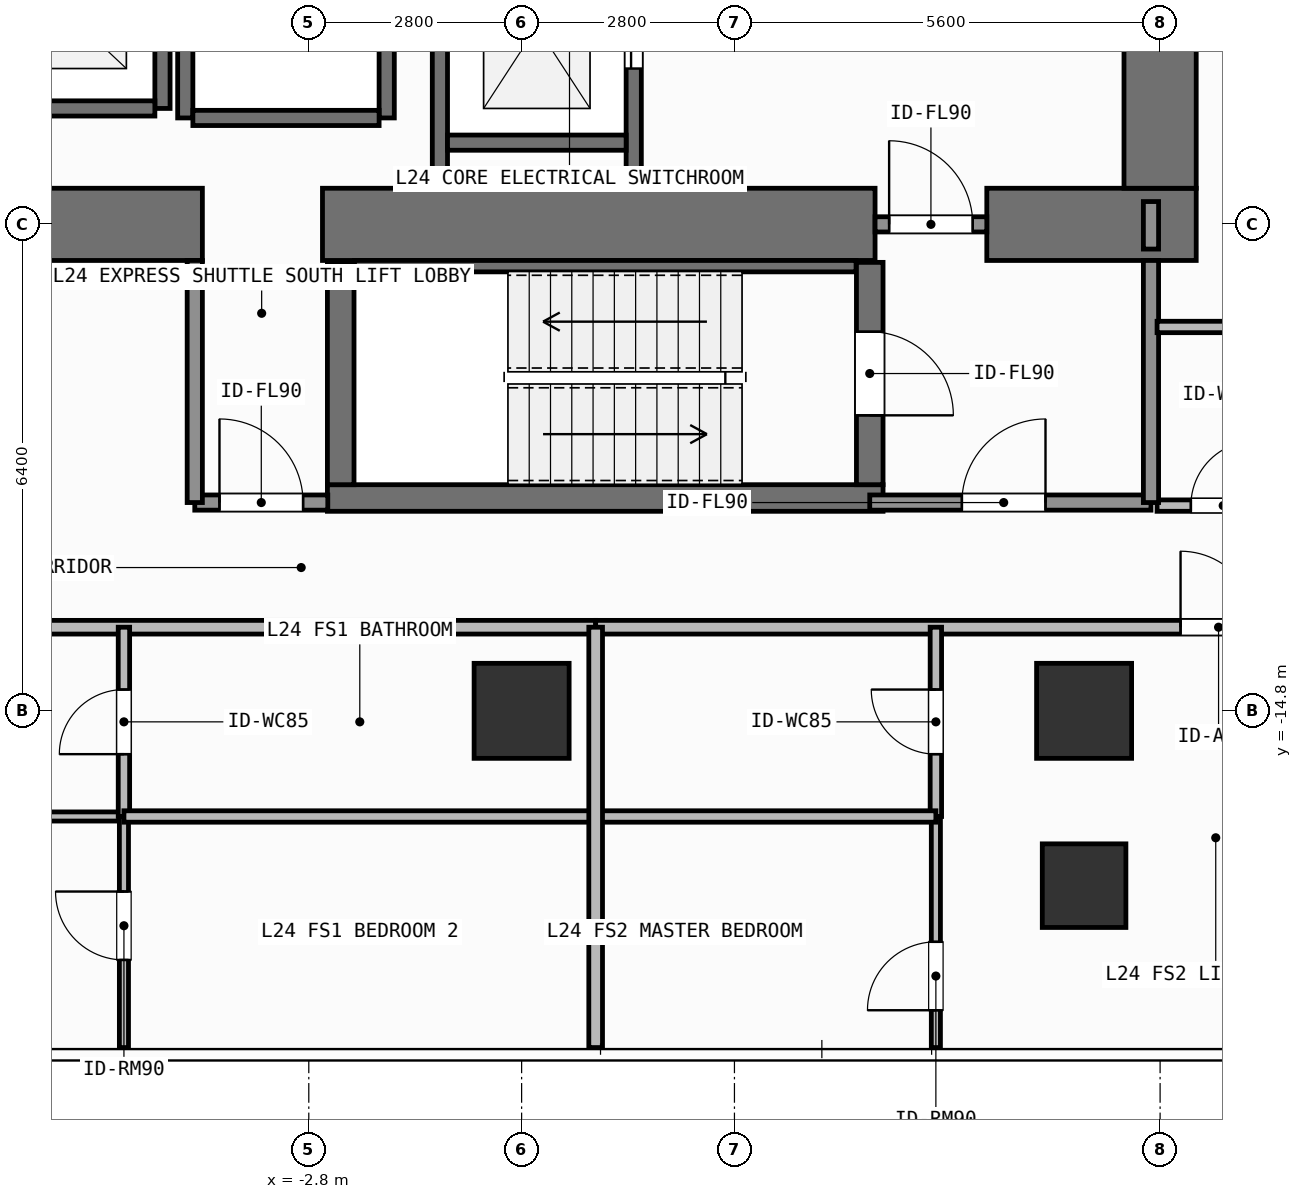
"""IFC4 building model, lengths in metres.
Left out: names, types, materials, properties, quantities, classifications, styles, units other than length and angle.
Written with IfcOpenShell. Run it as: python <this file> out.ifc"""

import sys

from ifc_helpers import new_model, si_unit, direction, frame, frame_2d, origin, origin_2d, place, context, subcontext, project, spatial, rectangle, extrude, element, fill, save


model = new_model("IFC4")
c1 = context("Model", 3, precision=1e-05, world=origin(), true_north=direction((0.0, 1.0)))
c2 = subcontext(c1, "Body", "Model", "MODEL_VIEW")
j1 = project(units=[si_unit("LENGTHUNIT", "METRE"), si_unit("PLANEANGLEUNIT", "RADIAN")], contexts=[c1])
p1 = place(None, origin())
s1 = spatial("IfcSite", under=j1, at=p1, CompositionType="ELEMENT")
p2 = place(p1, origin())
s2 = spatial("IfcBuilding", under=s1, at=p2, CompositionType="ELEMENT")
p3 = place(p2, frame((0.0, 0.0, 96.9)))
s3 = spatial("IfcBuildingStorey", under=s2, at=p3, CompositionType="ELEMENT", Elevation=96.9)
p4 = place(p3, frame((-7.55, -8.4, 0.0), z_axis=(0.0, 0.0, 1.0), x_axis=(1.0, 0.0, 0.0)))
e1 = element("IfcWall", 1, at=p4, inside=s3, PredefinedType="SHEAR", context=c2, shape_type="SweptSolid", body=[
    extrude(rectangle(XDim=3.35, YDim=0.95, at=frame_2d((1.675, 0.0))), origin(), (0.0, 0.0, 1.0), 3.9),
])
p5 = place(p3, frame((-2.62, -8.4, 0.0), z_axis=(0.0, 0.0, 1.0), x_axis=(1.0, 0.0, 0.0)))
e2 = element("IfcWall", 2, at=p5, inside=s3, PredefinedType="SHEAR", context=c2, shape_type="SweptSolid", body=[
    extrude(rectangle(XDim=7.27, YDim=0.95, at=frame_2d((3.635, 0.0))), origin(), (0.0, 0.0, 1.0), 3.9),
])
p6 = place(p3, frame((6.12, -8.4, 0.0), z_axis=(0.0, 0.0, 1.0), x_axis=(1.0, 0.0, 0.0)))
e3 = element("IfcWall", 3, at=p6, inside=s3, PredefinedType="SHEAR", context=c2, shape_type="SweptSolid", body=[
    extrude(rectangle(XDim=2.755, YDim=0.95, at=frame_2d((1.377, 0.0))), origin(), (0.0, 0.0, 1.0), 3.9),
])
p7 = place(p3, frame((8.4, -7.925, 0.0), z_axis=(0.0, 0.0, 1.0), x_axis=(0.0, 1.0, 0.0)))
e4 = element("IfcWall", 4, at=p7, inside=s3, PredefinedType="SHEAR", context=c2, shape_type="SweptSolid", body=[
    extrude(rectangle(XDim=2.1, YDim=0.95, at=frame_2d((1.05, 0.0))), origin(), (0.0, 0.0, 1.0), 3.9),
])
p8 = place(p3, frame((-2.555, -12.0, 0.0), z_axis=(0.0, 0.0, 1.0), x_axis=(1.0, 0.0, 0.0)))
e5 = element("IfcWall", 5, at=p8, inside=s3, PredefinedType="SHEAR", context=c2, shape_type="SweptSolid", body=[
    extrude(rectangle(XDim=7.31, YDim=0.35, at=frame_2d((3.655, 0.0))), origin(), (0.0, 0.0, 1.0), 3.9),
])
p9 = place(p3, frame((-2.2, -8.95, 0.0), z_axis=(0.0, 0.0, 1.0), x_axis=(1.0, 0.0, 0.0)))
e6 = element("IfcWall", 6, at=p9, inside=s3, PredefinedType="SHEAR", context=c2, shape_type="SweptSolid", body=[
    extrude(rectangle(XDim=6.6, YDim=0.15, at=frame_2d((3.3, 0.0))), origin(), (0.0, 0.0, 1.0), 3.9),
])
p10 = place(p3, frame((-2.38, -11.825, 0.0), z_axis=(0.0, 0.0, 1.0), x_axis=(0.0, 1.0, 0.0)))
e7 = element("IfcWall", 7, at=p10, inside=s3, PredefinedType="SHEAR", context=c2, shape_type="SweptSolid", body=[
    extrude(rectangle(XDim=2.925, YDim=0.35, at=frame_2d((1.462, 0.0))), origin(), (0.0, 0.0, 1.0), 3.9),
])
p11 = place(p3, frame((4.58, -8.9, 0.0), z_axis=(0.0, 0.0, 1.0), x_axis=(0.0, -1.0, 0.0)))
e8 = element("IfcWall", 8, at=p11, inside=s3, PredefinedType="SHEAR", context=c2, shape_type="SweptSolid", body=[
    extrude(rectangle(XDim=2.925, YDim=0.35, at=frame_2d((1.462, 0.0))), origin(), (0.0, 0.0, 1.0), 3.9),
])
p12 = place(p11, frame((0.913, 0.0, 0.0)))
e9 = element("IfcOpeningElement", 9, at=p12, cuts=e8, PredefinedType="OPENING", context=c2, shape_type="SweptSolid", body=[
    extrude(rectangle(XDim=1.1, YDim=2.15, at=frame_2d((0.55, 1.075))), frame((0.0, 0.185, 0.0), z_axis=(0.0, -1.0, 0.0), x_axis=(1.0, 0.0, 0.0)), (0.0, 0.0, 1.0), 0.37),
])
for number, where, z_axis, x_axis in (
    (10, (0.0, -14.8, 0.0), (0.0, 0.0, 1.0), (1.0, 0.0, 0.0)),
    (11, (7.4, -14.8, 0.0), (0.0, 0.0, 1.0), (1.0, 0.0, 0.0)),
):
    element("IfcColumn", number, at=place(p3, frame(where, z_axis=z_axis, x_axis=x_axis)), inside=s3, PredefinedType="COLUMN", context=c2, shape_type="SweptSolid", body=[
        extrude(rectangle(XDim=1.25, YDim=1.25, at=origin_2d()), origin(), (0.0, 0.0, 1.0), 3.9),
    ])
p13 = place(p3, frame((7.4, -17.1, 0.0), z_axis=(0.0, 0.0, 1.0), x_axis=(1.0, 0.0, 0.0)))
e12 = element("IfcColumn", 12, at=p13, inside=s3, PredefinedType="COLUMN", context=c2, shape_type="SweptSolid", body=[
    extrude(rectangle(XDim=1.1, YDim=1.1, at=origin_2d()), origin(), (0.0, 0.0, 1.0), 3.9),
])
p14 = place(p3, frame((-4.725, -6.875, 0.0), z_axis=(0.0, 0.0, 1.0), x_axis=(0.0, 1.0, 0.0)))
e13 = element("IfcWall", 13, at=p14, inside=s3, PredefinedType="SHEAR", context=c2, shape_type="SweptSolid", body=[
    extrude(rectangle(XDim=2.55, YDim=0.2, at=frame_2d((1.275, 0.0))), origin(), (0.0, 0.0, 1.0), 3.68),
])
p15 = place(p3, frame((-7.175, -6.875, 0.0), z_axis=(0.0, 0.0, 1.0), x_axis=(1.0, 0.0, 0.0)))
e14 = element("IfcWall", 14, at=p15, inside=s3, PredefinedType="SHEAR", context=c2, shape_type="SweptSolid", body=[
    extrude(rectangle(XDim=2.35, YDim=0.2, at=frame_2d((1.175, 0.0))), origin(), (0.0, 0.0, 1.0), 3.68),
])
for number, where, z_axis, x_axis in (
    (15, (-4.425, -7.0, 0.0), (0.0, 0.0, 1.0), (0.0, 1.0, 0.0)),
    (16, (-1.775, -7.0, 0.0), (0.0, 0.0, 1.0), (0.0, 1.0, 0.0)),
):
    element("IfcWall", number, at=place(p3, frame(where, z_axis=z_axis, x_axis=x_axis)), inside=s3, PredefinedType="SHEAR", context=c2, shape_type="SweptSolid", body=[
        extrude(rectangle(XDim=2.8, YDim=0.2, at=frame_2d((1.4, 0.0))), origin(), (0.0, 0.0, 1.0), 3.68),
    ])
p16 = place(p3, frame((-4.325, -7.0, 0.0), z_axis=(0.0, 0.0, 1.0), x_axis=(1.0, 0.0, 0.0)))
e17 = element("IfcWall", 17, at=p16, inside=s3, PredefinedType="SHEAR", context=c2, shape_type="SweptSolid", body=[
    extrude(rectangle(XDim=2.45, YDim=0.2, at=frame_2d((1.225, 0.0))), origin(), (0.0, 0.0, 1.0), 3.68),
])
p17 = place(p3, frame((-1.075, -7.925, 0.0), z_axis=(0.0, 0.0, 1.0), x_axis=(0.0, 1.0, 0.0)))
e18 = element("IfcWall", 18, at=p17, inside=s3, PredefinedType="SHEAR", context=c2, shape_type="SweptSolid", body=[
    extrude(rectangle(XDim=3.65, YDim=0.2, at=frame_2d((1.825, 0.0))), origin(), (0.0, 0.0, 1.0), 3.68),
])
p18 = place(p3, frame((1.475, -7.925, 0.0), z_axis=(0.0, 0.0, 1.0), x_axis=(0.0, 1.0, 0.0)))
e19 = element("IfcWall", 19, at=p18, inside=s3, PredefinedType="SHEAR", context=c2, shape_type="SweptSolid", body=[
    extrude(rectangle(XDim=3.65, YDim=0.2, at=frame_2d((1.825, 0.0))), origin(), (0.0, 0.0, 1.0), 3.68),
])
p19 = place(p18, frame((1.575, 0.0, 0.0)))
e20 = element("IfcOpeningElement", 20, at=p19, cuts=e19, PredefinedType="OPENING", context=c2, shape_type="SweptSolid", body=[
    extrude(rectangle(XDim=1.1, YDim=2.2, at=frame_2d((0.55, 1.1))), frame((0.0, 0.11, 0.0), z_axis=(0.0, -1.0, 0.0), x_axis=(1.0, 0.0, 0.0)), (0.0, 0.0, 1.0), 0.22),
])
p20 = place(p3, frame((-0.975, -7.325, 0.0), z_axis=(0.0, 0.0, 1.0), x_axis=(1.0, 0.0, 0.0)))
e21 = element("IfcWall", 21, at=p20, inside=s3, PredefinedType="SHEAR", context=c2, shape_type="SweptSolid", body=[
    extrude(rectangle(XDim=2.35, YDim=0.2, at=frame_2d((1.175, 0.0))), origin(), (0.0, 0.0, 1.0), 3.68),
])
p21 = place(p3, frame((4.58, -12.06, 0.0), z_axis=(0.0, 0.0, 1.0), x_axis=(1.0, 0.0, 0.0)))
e22 = element("IfcWall", 22, at=p21, inside=s3, PredefinedType="SOLIDWALL", context=c2, shape_type="SweptSolid", body=[
    extrude(rectangle(XDim=3.7, YDim=0.2, at=frame_2d((1.85, 0.0))), origin(), (0.0, 0.0, 1.0), 3.68),
])
p22 = place(p21, frame((1.212, 0.0, 0.0)))
e23 = element("IfcOpeningElement", 23, at=p22, cuts=e22, PredefinedType="OPENING", context=c2, shape_type="SweptSolid", body=[
    extrude(rectangle(XDim=1.1, YDim=2.15, at=frame_2d((0.55, 1.075))), frame((0.0, 0.11, 0.0), z_axis=(0.0, -1.0, 0.0), x_axis=(1.0, 0.0, 0.0)), (0.0, 0.0, 1.0), 0.22),
])
p23 = place(p3, frame((4.65, -8.4, 0.0), z_axis=(0.0, 0.0, 1.0), x_axis=(1.0, 0.0, 0.0)))
e24 = element("IfcWall", 24, at=p23, inside=s3, PredefinedType="SOLIDWALL", context=c2, shape_type="SweptSolid", body=[
    extrude(rectangle(XDim=1.47, YDim=0.2, at=frame_2d((0.735, 0.0))), origin(), (0.0, 0.0, 1.0), 2.72),
])
p24 = place(p23, frame((0.185, 0.0, 0.0)))
e25 = element("IfcOpeningElement", 25, at=p24, cuts=e24, PredefinedType="OPENING", context=c2, shape_type="SweptSolid", body=[
    extrude(rectangle(XDim=1.1, YDim=2.15, at=frame_2d((0.55, 1.075))), frame((0.0, 0.11, 0.0), z_axis=(0.0, -1.0, 0.0), x_axis=(1.0, 0.0, 0.0)), (0.0, 0.0, 1.0), 0.22),
])
p25 = place(p3, frame((-4.3, -12.06, 0.0), z_axis=(0.0, 0.0, 1.0), x_axis=(1.0, 0.0, 0.0)))
e26 = element("IfcWall", 26, at=p25, inside=s3, PredefinedType="SOLIDWALL", context=c2, shape_type="SweptSolid", body=[
    extrude(rectangle(XDim=1.75, YDim=0.2, at=frame_2d((0.875, 0.0))), origin(), (0.0, 0.0, 1.0), 3.68),
])
p26 = place(p25, frame((0.325, 0.0, 0.0)))
e27 = element("IfcOpeningElement", 27, at=p26, cuts=e26, PredefinedType="OPENING", context=c2, shape_type="SweptSolid", body=[
    extrude(rectangle(XDim=1.1, YDim=2.15, at=frame_2d((0.55, 1.075))), frame((0.0, 0.11, 0.0), z_axis=(0.0, -1.0, 0.0), x_axis=(1.0, 0.0, 0.0)), (0.0, 0.0, 1.0), 0.22),
])
p27 = place(p3, frame((8.36, -12.1, 0.0), z_axis=(0.0, 0.0, 1.0), x_axis=(1.0, 0.0, 0.0)))
e28 = element("IfcWall", 28, at=p27, inside=s3, PredefinedType="PARTITIONING", context=c2, shape_type="SweptSolid", body=[
    extrude(rectangle(XDim=1.74, YDim=0.15, at=frame_2d((0.87, 0.0))), origin(), (0.0, 0.0, 1.0), 3.68),
])
p28 = place(p27, frame((0.445, 0.0, 0.0)))
e29 = element("IfcOpeningElement", 29, at=p28, cuts=e28, PredefinedType="OPENING", context=c2, shape_type="SweptSolid", body=[
    extrude(rectangle(XDim=0.85, YDim=2.1, at=frame_2d((0.425, 1.05))), frame((0.0, 0.085, 0.0), z_axis=(0.0, -1.0, 0.0), x_axis=(1.0, 0.0, 0.0)), (0.0, 0.0, 1.0), 0.17),
])
p29 = place(p3, frame((-24.42, -13.7, 0.0), z_axis=(0.0, 0.0, 1.0), x_axis=(1.0, 0.0, 0.0)))
e30 = element("IfcWall", 30, at=p29, inside=s3, PredefinedType="PARTITIONING", context=c2, shape_type="SweptSolid", body=[
    extrude(rectangle(XDim=25.394, YDim=0.18, at=frame_2d((12.697, 0.0))), origin(), (0.0, 0.0, 1.0), 3.68),
])
p30 = place(p29, frame((10.939, 0.0, 0.0)))
e31 = element("IfcOpeningElement", 31, at=p30, cuts=e30, PredefinedType="OPENING", context=c2, shape_type="SweptSolid", body=[
    extrude(rectangle(XDim=1.0, YDim=2.2, at=frame_2d((0.5, 1.1))), frame((0.0, 0.1, 0.0), z_axis=(0.0, -1.0, 0.0), x_axis=(1.0, 0.0, 0.0)), (0.0, 0.0, 1.0), 0.2),
])
p31 = place(p3, frame((-20.725, -16.19, 0.0), z_axis=(0.0, 0.0, 1.0), x_axis=(1.0, 0.0, 0.0)))
e32 = element("IfcWall", 32, at=p31, inside=s3, PredefinedType="PARTITIONING", context=c2, shape_type="SweptSolid", body=[
    extrude(rectangle(XDim=15.493, YDim=0.12, at=frame_2d((7.747, 0.0))), origin(), (0.0, 0.0, 1.0), 3.68),
])
p32 = place(p31, frame((7.296, 0.0, 0.0)))
e33 = element("IfcOpeningElement", 33, at=p32, cuts=e32, PredefinedType="OPENING", context=c2, shape_type="SweptSolid", body=[
    extrude(rectangle(XDim=0.9, YDim=2.1, at=frame_2d((0.45, 1.05))), frame((0.0, 0.07, 0.0), z_axis=(0.0, -1.0, 0.0), x_axis=(1.0, 0.0, 0.0)), (0.0, 0.0, 1.0), 0.14),
])
p33 = place(p3, frame((-5.232, -16.19, 0.0), z_axis=(0.0, 0.0, 1.0), x_axis=(0.0, 1.0, 0.0)))
e34 = element("IfcWall", 34, at=p33, inside=s3, PredefinedType="PARTITIONING", context=c2, shape_type="SweptSolid", body=[
    extrude(rectangle(XDim=2.49, YDim=0.15, at=frame_2d((1.245, 0.0))), origin(), (0.0, 0.0, 1.0), 3.68),
])
p34 = place(p33, frame((0.82, 0.0, 0.0)))
e35 = element("IfcOpeningElement", 35, at=p34, cuts=e34, PredefinedType="OPENING", context=c2, shape_type="SweptSolid", body=[
    extrude(rectangle(XDim=0.85, YDim=2.1, at=frame_2d((0.425, 1.05))), frame((0.0, 0.085, 0.0), z_axis=(0.0, -1.0, 0.0), x_axis=(1.0, 0.0, 0.0)), (0.0, 0.0, 1.0), 0.17),
])
p35 = place(p3, frame((-5.232, -19.23, 0.0), z_axis=(0.0, 0.0, 1.0), x_axis=(0.0, 1.0, 0.0)))
e36 = element("IfcWall", 36, at=p35, inside=s3, PredefinedType="PARTITIONING", context=c2, shape_type="SweptSolid", body=[
    extrude(rectangle(XDim=3.04, YDim=0.12, at=frame_2d((1.52, 0.0))), origin(), (0.0, 0.0, 1.0), 3.68),
])
p36 = place(p35, frame((1.153, 0.0, 0.0)))
e37 = element("IfcOpeningElement", 37, at=p36, cuts=e36, PredefinedType="OPENING", context=c2, shape_type="SweptSolid", body=[
    extrude(rectangle(XDim=0.9, YDim=2.1, at=frame_2d((0.45, 1.05))), frame((0.0, 0.07, 0.0), z_axis=(0.0, -1.0, 0.0), x_axis=(1.0, 0.0, 0.0)), (0.0, 0.0, 1.0), 0.14),
])
p37 = place(p3, frame((0.974, -13.7, 0.0), z_axis=(0.0, 0.0, 1.0), x_axis=(1.0, 0.0, 0.0)))
e38 = element("IfcWall", 38, at=p37, inside=s3, PredefinedType="PARTITIONING", context=c2, shape_type="SweptSolid", body=[
    extrude(rectangle(XDim=17.646, YDim=0.18, at=frame_2d((8.823, 0.0))), origin(), (0.0, 0.0, 1.0), 3.68),
])
p38 = place(p37, frame((7.695, 0.0, 0.0)))
e39 = element("IfcOpeningElement", 39, at=p38, cuts=e38, PredefinedType="OPENING", context=c2, shape_type="SweptSolid", body=[
    extrude(rectangle(XDim=1.0, YDim=2.2, at=frame_2d((0.5, 1.1))), frame((0.0, 0.1, 0.0), z_axis=(0.0, -1.0, 0.0), x_axis=(1.0, 0.0, 0.0)), (0.0, 0.0, 1.0), 0.2),
])
p39 = place(p3, frame((5.45, -16.19, 0.0), z_axis=(0.0, 0.0, 1.0), x_axis=(0.0, 1.0, 0.0)))
e40 = element("IfcWall", 40, at=p39, inside=s3, PredefinedType="PARTITIONING", context=c2, shape_type="SweptSolid", body=[
    extrude(rectangle(XDim=2.49, YDim=0.15, at=frame_2d((1.245, 0.0))), origin(), (0.0, 0.0, 1.0), 3.68),
])
p40 = place(p39, frame((0.82, 0.0, 0.0)))
e41 = element("IfcOpeningElement", 41, at=p40, cuts=e40, PredefinedType="OPENING", context=c2, shape_type="SweptSolid", body=[
    extrude(rectangle(XDim=0.85, YDim=2.1, at=frame_2d((0.425, 1.05))), frame((0.0, 0.085, 0.0), z_axis=(0.0, -1.0, 0.0), x_axis=(1.0, 0.0, 0.0)), (0.0, 0.0, 1.0), 0.17),
])
p41 = place(p3, frame((5.45, -19.23, 0.0), z_axis=(0.0, 0.0, 1.0), x_axis=(0.0, 1.0, 0.0)))
e42 = element("IfcWall", 42, at=p41, inside=s3, PredefinedType="PARTITIONING", context=c2, shape_type="SweptSolid", body=[
    extrude(rectangle(XDim=3.04, YDim=0.12, at=frame_2d((1.52, 0.0))), origin(), (0.0, 0.0, 1.0), 3.68),
])
p42 = place(p41, frame((0.491, 0.0, 0.0)))
e43 = element("IfcOpeningElement", 43, at=p42, cuts=e42, PredefinedType="OPENING", context=c2, shape_type="SweptSolid", body=[
    extrude(rectangle(XDim=0.9, YDim=2.1, at=frame_2d((0.45, 1.05))), frame((0.0, 0.07, 0.0), z_axis=(0.0, -1.0, 0.0), x_axis=(1.0, 0.0, 0.0)), (0.0, 0.0, 1.0), 0.14),
])
for number, where, z_axis, x_axis in (
    (44, (8.28, -12.06, 0.0), (0.0, 0.0, 1.0), (0.0, 1.0, 0.0)),
    (45, (-4.3, -12.06, 0.0), (0.0, 0.0, 1.0), (0.0, 1.0, 0.0)),
):
    element("IfcWall", number, at=place(p3, frame(where, z_axis=z_axis, x_axis=x_axis)), inside=s3, PredefinedType="SOLIDWALL", context=c2, shape_type="SweptSolid", body=[
        extrude(rectangle(XDim=3.185, YDim=0.2, at=frame_2d((1.593, 0.0))), origin(), (0.0, 0.0, 1.0), 3.68),
    ])
p43 = place(p3, frame((8.28, -8.725, 0.0), z_axis=(0.0, 0.0, 1.0), x_axis=(0.0, 1.0, 0.0)))
e46 = element("IfcWall", 46, at=p43, inside=s3, PredefinedType="SOLIDWALL", context=c2, shape_type="SweptSolid", body=[
    extrude(rectangle(XDim=0.625, YDim=0.2, at=frame_2d((0.312, 0.0))), origin(), (0.0, 0.0, 1.0), 3.68),
])
p44 = place(p3, frame((8.36, -9.75, 0.0), z_axis=(0.0, 0.0, 1.0), x_axis=(1.0, 0.0, 0.0)))
e47 = element("IfcWall", 47, at=p44, inside=s3, PredefinedType="PARTITIONING", context=c2, shape_type="SweptSolid", body=[
    extrude(rectangle(XDim=1.74, YDim=0.15, at=frame_2d((0.87, 0.0))), origin(), (0.0, 0.0, 1.0), 3.68),
])
p45 = place(p3, frame((-5.232, -16.19, 0.0), z_axis=(0.0, 0.0, 1.0), x_axis=(1.0, 0.0, 0.0)))
e48 = element("IfcWall", 48, at=p45, inside=s3, PredefinedType="PARTITIONING", context=c2, shape_type="SweptSolid", body=[
    extrude(rectangle(XDim=6.206, YDim=0.15, at=frame_2d((3.103, 0.0))), origin(), (0.0, 0.0, 1.0), 3.68),
])
p46 = place(p3, frame((0.974, -16.19, 0.0), z_axis=(0.0, 0.0, 1.0), x_axis=(1.0, 0.0, 0.0)))
e49 = element("IfcWall", 49, at=p46, inside=s3, PredefinedType="PARTITIONING", context=c2, shape_type="SweptSolid", body=[
    extrude(rectangle(XDim=4.476, YDim=0.15, at=frame_2d((2.238, 0.0))), origin(), (0.0, 0.0, 1.0), 3.68),
])
p47 = place(p3, frame((0.974, -19.23, 0.0), z_axis=(0.0, 0.0, 1.0), x_axis=(0.0, 1.0, 0.0)))
e50 = element("IfcWall", 50, at=p47, inside=s3, PredefinedType="PARTITIONING", context=c2, shape_type="SweptSolid", body=[
    extrude(rectangle(XDim=5.53, YDim=0.18, at=frame_2d((2.765, 0.0))), origin(), (0.0, 0.0, 1.0), 3.68),
])
p48 = place(p19, origin())
e51 = element("IfcDoor", 51, at=p48, inside=s3, OperationType="SLIDING_TO_LEFT", PredefinedType="DOOR", context=c2, shape_type="SweptSolid", body=[
    extrude(rectangle(XDim=1.1, YDim=2.2, at=frame_2d((0.55, 1.1))), frame((0.0, 0.025, 0.0), z_axis=(0.0, -1.0, 0.0), x_axis=(1.0, 0.0, 0.0)), (0.0, 0.0, 1.0), 0.05),
])
fill(e20, e51)
p49 = place(p12, origin())
e52 = element("IfcDoor", 52, at=p49, inside=s3, OperationType="SINGLE_SWING_RIGHT", PredefinedType="DOOR", context=c2, shape_type="SweptSolid", body=[
    extrude(rectangle(XDim=1.1, YDim=2.15, at=frame_2d((0.55, 1.075))), frame((0.0, 0.025, 0.0), z_axis=(0.0, -1.0, 0.0), x_axis=(1.0, 0.0, 0.0)), (0.0, 0.0, 1.0), 0.05),
])
fill(e9, e52)
p50 = place(p22, origin())
e53 = element("IfcDoor", 53, at=p50, inside=s3, OperationType="SINGLE_SWING_RIGHT", PredefinedType="DOOR", context=c2, shape_type="SweptSolid", body=[
    extrude(rectangle(XDim=1.1, YDim=2.15, at=frame_2d((0.55, 1.075))), frame((0.0, 0.025, 0.0), z_axis=(0.0, -1.0, 0.0), x_axis=(1.0, 0.0, 0.0)), (0.0, 0.0, 1.0), 0.05),
])
fill(e23, e53)
p51 = place(p24, origin())
e54 = element("IfcDoor", 54, at=p51, inside=s3, OperationType="SINGLE_SWING_LEFT", PredefinedType="DOOR", context=c2, shape_type="SweptSolid", body=[
    extrude(rectangle(XDim=1.1, YDim=2.15, at=frame_2d((0.55, 1.075))), frame((0.0, 0.025, 0.0), z_axis=(0.0, -1.0, 0.0), x_axis=(1.0, 0.0, 0.0)), (0.0, 0.0, 1.0), 0.05),
])
fill(e25, e54)
p52 = place(p26, origin())
e55 = element("IfcDoor", 55, at=p52, inside=s3, OperationType="SINGLE_SWING_LEFT", PredefinedType="DOOR", context=c2, shape_type="SweptSolid", body=[
    extrude(rectangle(XDim=1.1, YDim=2.15, at=frame_2d((0.55, 1.075))), frame((0.0, 0.025, 0.0), z_axis=(0.0, -1.0, 0.0), x_axis=(1.0, 0.0, 0.0)), (0.0, 0.0, 1.0), 0.05),
])
fill(e27, e55)
p53 = place(p28, origin())
e56 = element("IfcDoor", 56, at=p53, inside=s3, OperationType="SINGLE_SWING_RIGHT", PredefinedType="DOOR", context=c2, shape_type="SweptSolid", body=[
    extrude(rectangle(XDim=0.85, YDim=2.1, at=frame_2d((0.425, 1.05))), frame((0.0, 0.025, 0.0), z_axis=(0.0, -1.0, 0.0), x_axis=(1.0, 0.0, 0.0)), (0.0, 0.0, 1.0), 0.05),
])
fill(e29, e56)
p54 = place(p34, origin())
e57 = element("IfcDoor", 57, at=p54, inside=s3, OperationType="SINGLE_SWING_LEFT", PredefinedType="DOOR", context=c2, shape_type="SweptSolid", body=[
    extrude(rectangle(XDim=0.85, YDim=2.1, at=frame_2d((0.425, 1.05))), frame((0.0, 0.025, 0.0), z_axis=(0.0, -1.0, 0.0), x_axis=(1.0, 0.0, 0.0)), (0.0, 0.0, 1.0), 0.05),
])
fill(e35, e57)
p55 = place(p36, origin())
e58 = element("IfcDoor", 58, at=p55, inside=s3, OperationType="SINGLE_SWING_RIGHT", PredefinedType="DOOR", context=c2, shape_type="SweptSolid", body=[
    extrude(rectangle(XDim=0.9, YDim=2.1, at=frame_2d((0.45, 1.05))), frame((0.0, 0.025, 0.0), z_axis=(0.0, -1.0, 0.0), x_axis=(1.0, 0.0, 0.0)), (0.0, 0.0, 1.0), 0.05),
])
fill(e37, e58)
p56 = place(p38, origin())
e59 = element("IfcDoor", 59, at=p56, inside=s3, OperationType="SINGLE_SWING_LEFT", PredefinedType="DOOR", context=c2, shape_type="SweptSolid", body=[
    extrude(rectangle(XDim=1.0, YDim=2.2, at=frame_2d((0.5, 1.1))), frame((0.0, 0.025, 0.0), z_axis=(0.0, -1.0, 0.0), x_axis=(1.0, 0.0, 0.0)), (0.0, 0.0, 1.0), 0.05),
])
fill(e39, e59)
p57 = place(p40, origin())
e60 = element("IfcDoor", 60, at=p57, inside=s3, OperationType="SINGLE_SWING_RIGHT", PredefinedType="DOOR", context=c2, shape_type="SweptSolid", body=[
    extrude(rectangle(XDim=0.85, YDim=2.1, at=frame_2d((0.425, 1.05))), frame((0.0, 0.025, 0.0), z_axis=(0.0, -1.0, 0.0), x_axis=(1.0, 0.0, 0.0)), (0.0, 0.0, 1.0), 0.05),
])
fill(e41, e60)
p58 = place(p42, origin())
e61 = element("IfcDoor", 61, at=p58, inside=s3, OperationType="SINGLE_SWING_LEFT", PredefinedType="DOOR", context=c2, shape_type="SweptSolid", body=[
    extrude(rectangle(XDim=0.9, YDim=2.1, at=frame_2d((0.45, 1.05))), frame((0.0, 0.025, 0.0), z_axis=(0.0, -1.0, 0.0), x_axis=(1.0, 0.0, 0.0)), (0.0, 0.0, 1.0), 0.05),
])
fill(e43, e61)
save(model, sys.argv[1])
